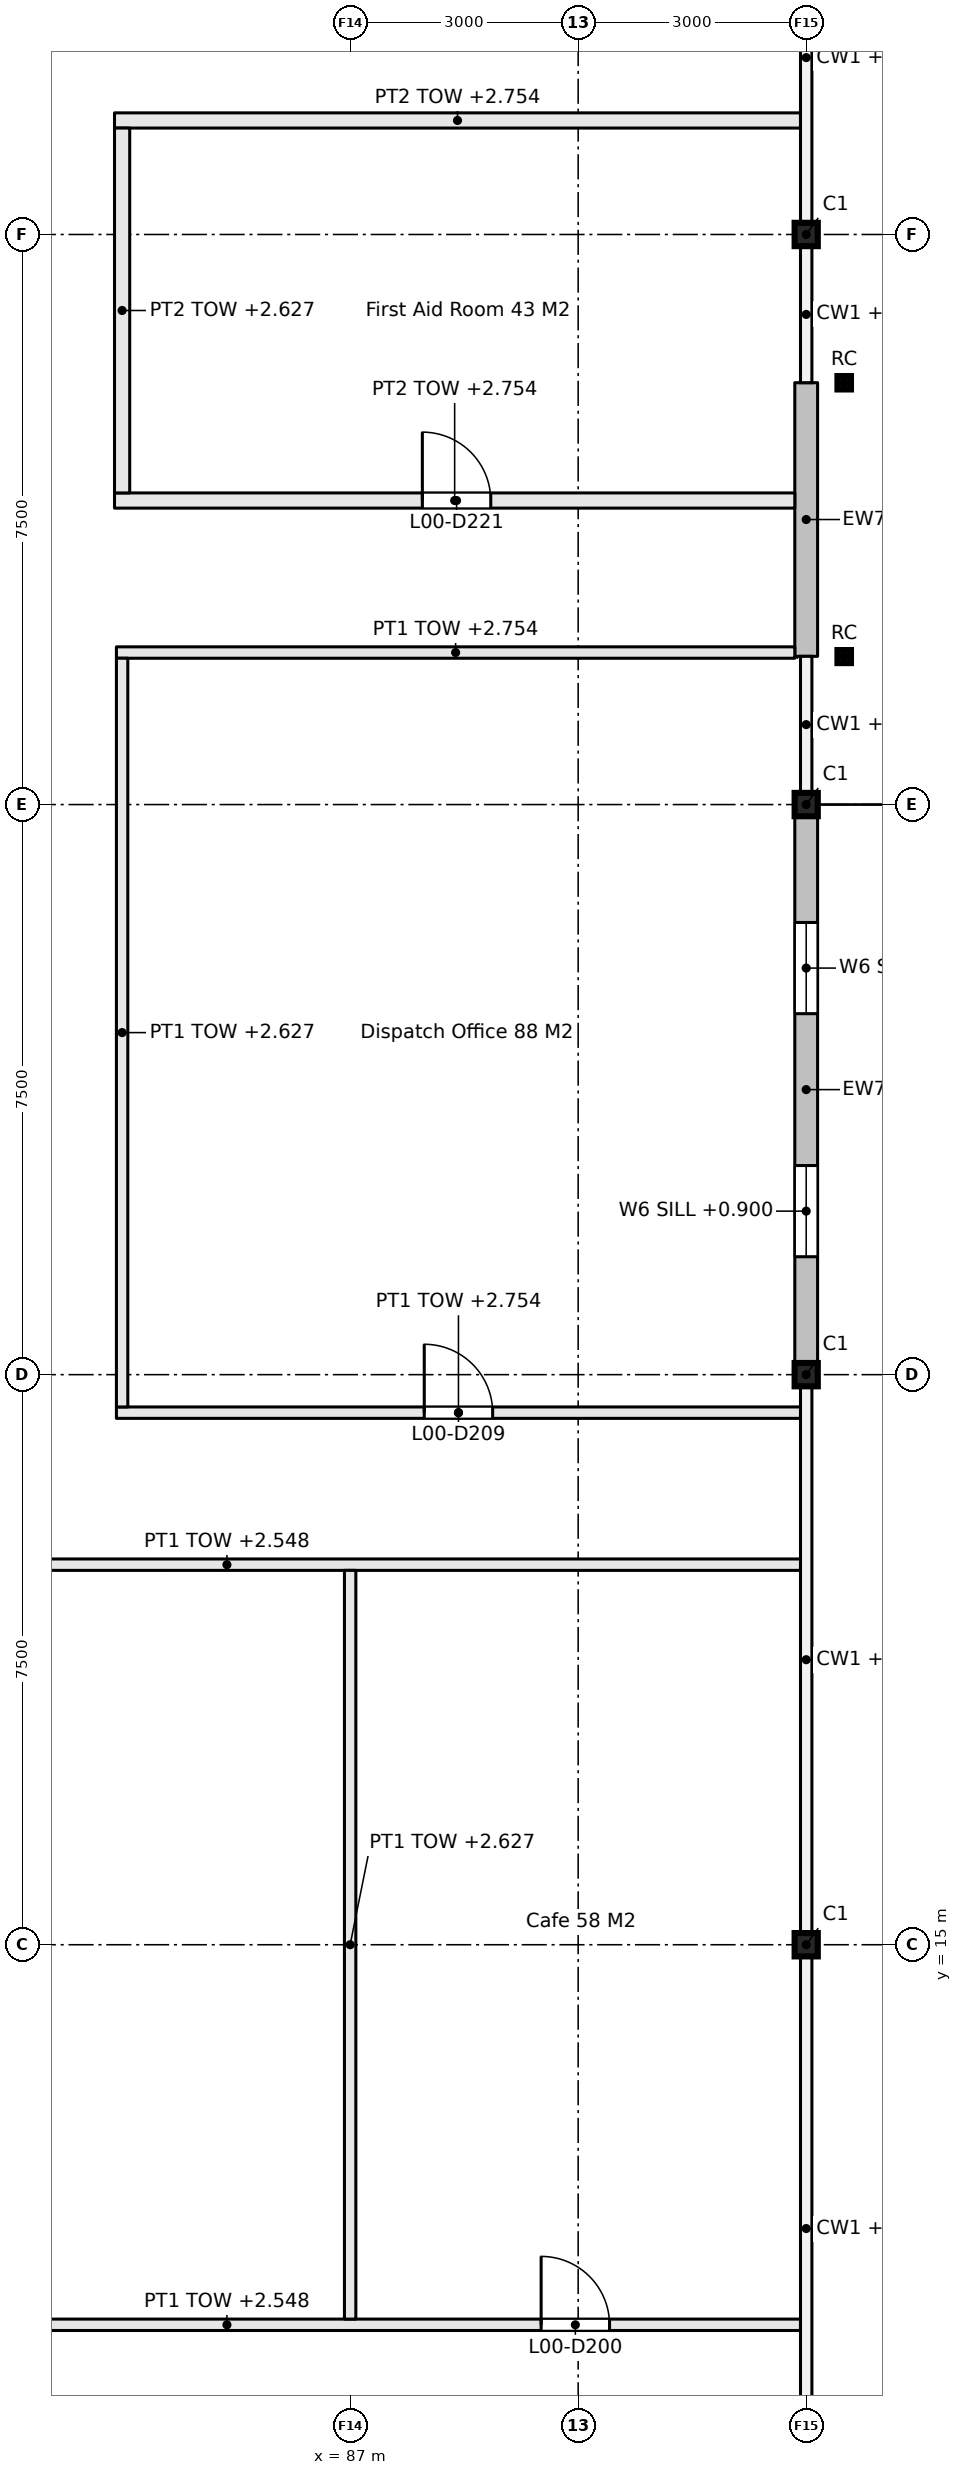
"""IFC4 building model, lengths in metres.
Left out: names, types, materials, properties, quantities, classifications, styles, units other than length and angle.
Written with IfcOpenShell. Run it as: python <this file> out.ifc"""

import sys

from ifc_helpers import new_model, si_unit, direction, frame, frame_2d, origin, origin_2d, place, context, subcontext, project, spatial, rectangle, hollow_rectangle, i_section, extrude, element, fill, save


model = new_model("IFC4")
c1 = context("Model", 3, precision=1e-05, world=origin(), true_north=direction((0.0, 1.0)))
c2 = subcontext(c1, "Body", "Model", "MODEL_VIEW")
j1 = project(units=[si_unit("LENGTHUNIT", "METRE"), si_unit("PLANEANGLEUNIT", "RADIAN")], contexts=[c1])
p1 = place(None, origin())
s1 = spatial("IfcSite", under=j1, at=p1, CompositionType="ELEMENT")
p2 = place(p1, origin())
s2 = spatial("IfcBuilding", under=s1, at=p2, CompositionType="ELEMENT")
p3 = place(p2, origin())
s3 = spatial("IfcBuildingStorey", under=s2, at=p3, CompositionType="ELEMENT", Elevation=0.0)
for number, where, z_axis, x_axis in (
    (1, (93.0, 15.0, -0.25), (0.0, 0.0, 1.0), (1.0, 0.0, 0.0)),
    (2, (93.0, 22.5, -0.25), (0.0, 0.0, 1.0), (1.0, 0.0, 0.0)),
    (3, (93.0, 30.0, -0.25), (0.0, 0.0, 1.0), (1.0, 0.0, 0.0)),
    (4, (93.0, 37.5, -0.25), (0.0, 0.0, 1.0), (1.0, 0.0, 0.0)),
):
    element("IfcColumn", number, at=place(p3, frame(where, z_axis=z_axis, x_axis=x_axis)), inside=s3, PredefinedType="COLUMN", context=c2, shape_type="SweptSolid", body=[
        extrude(i_section(OverallWidth=0.305, OverallDepth=0.307, WebThickness=0.01, FlangeThickness=0.015, FilletRadius=0.015, at=origin_2d()), origin(), (0.0, 0.0, 1.0), 3.55),
    ])
for number, where, z_axis, x_axis in (
    (5, (93.5, 31.95, -0.25), (0.0, 0.0, 1.0), (1.0, 0.0, 0.0)),
    (6, (93.5, 35.55, -0.25), (0.0, 0.0, 1.0), (1.0, 0.0, 0.0)),
):
    element("IfcColumn", number, at=place(p3, frame(where, z_axis=z_axis, x_axis=x_axis)), inside=s3, PredefinedType="COLUMN", context=c2, shape_type="SweptSolid", body=[
        extrude(hollow_rectangle(XDim=0.178, YDim=0.178, WallThickness=0.01, at=origin_2d()), origin(), (0.0, 0.0, 1.0), 3.55),
    ])
p4 = place(p3, frame((71.925, 10.0, 0.0), z_axis=(0.0, 0.0, 1.0), x_axis=(1.0, 0.0, 0.0)))
e7 = element("IfcWall", 7, at=p4, inside=s3, PredefinedType="PARTITIONING", context=c2, shape_type="SweptSolid", body=[
    extrude(rectangle(XDim=21.0, YDim=0.15, at=frame_2d((10.5, 0.0))), origin(), (0.0, 0.0, 1.0), 2.548),
])
p5 = place(p4, frame((17.588, 0.0, 0.0)))
e8 = element("IfcOpeningElement", 8, at=p5, cuts=e7, PredefinedType="OPENING", context=c2, shape_type="SweptSolid", body=[
    extrude(rectangle(XDim=0.9, YDim=2.1, at=frame_2d((0.45, 1.05))), frame((0.0, 0.085, 0.0), z_axis=(0.0, -1.0, 0.0), x_axis=(1.0, 0.0, 0.0)), (0.0, 0.0, 1.0), 0.17),
])
p6 = place(p3, frame((71.925, 20.0, 0.0), z_axis=(0.0, 0.0, 1.0), x_axis=(1.0, 0.0, 0.0)))
e9 = element("IfcWall", 9, at=p6, inside=s3, PredefinedType="PARTITIONING", context=c2, shape_type="SweptSolid", body=[
    extrude(rectangle(XDim=21.0, YDim=0.15, at=frame_2d((10.5, 0.0))), origin(), (0.0, 0.0, 1.0), 2.548),
])
p7 = place(p3, frame((83.925, 22.0, 0.0), z_axis=(0.0, 0.0, 1.0), x_axis=(1.0, 0.0, 0.0)))
e10 = element("IfcWall", 10, at=p7, inside=s3, PredefinedType="PARTITIONING", context=c2, shape_type="SweptSolid", body=[
    extrude(rectangle(XDim=9.0, YDim=0.15, at=frame_2d((4.5, 0.0))), origin(), (0.0, 0.0, 1.0), 2.754),
])
p8 = place(p7, frame((4.05, 0.0, 0.0)))
e11 = element("IfcOpeningElement", 11, at=p8, cuts=e10, PredefinedType="OPENING", context=c2, shape_type="SweptSolid", body=[
    extrude(rectangle(XDim=0.9, YDim=2.1, at=frame_2d((0.45, 1.05))), frame((0.0, 0.085, 0.0), z_axis=(0.0, -1.0, 0.0), x_axis=(1.0, 0.0, 0.0)), (0.0, 0.0, 1.0), 0.17),
])
p9 = place(p3, frame((83.925, 32.0, 0.0), z_axis=(0.0, 0.0, 1.0), x_axis=(1.0, 0.0, 0.0)))
e12 = element("IfcWall", 12, at=p9, inside=s3, PredefinedType="PARTITIONING", context=c2, shape_type="SweptSolid", body=[
    extrude(rectangle(XDim=8.925, YDim=0.15, at=frame_2d((4.462, 0.0))), origin(), (0.0, 0.0, 1.0), 2.754),
])
p10 = place(p3, frame((83.9, 34.0, 0.0), z_axis=(0.0, 0.0, 1.0), x_axis=(1.0, 0.0, 0.0)))
e13 = element("IfcWall", 13, at=p10, inside=s3, PredefinedType="PARTITIONING", context=c2, shape_type="SweptSolid", body=[
    extrude(rectangle(XDim=8.95, YDim=0.2, at=frame_2d((4.475, 0.0))), origin(), (0.0, 0.0, 1.0), 2.754),
])
p11 = place(p10, frame((4.05, 0.0, 0.0)))
e14 = element("IfcOpeningElement", 14, at=p11, cuts=e13, PredefinedType="OPENING", context=c2, shape_type="SweptSolid", body=[
    extrude(rectangle(XDim=0.9, YDim=2.1, at=frame_2d((0.45, 1.05))), frame((0.0, 0.11, 0.0), z_axis=(0.0, -1.0, 0.0), x_axis=(1.0, 0.0, 0.0)), (0.0, 0.0, 1.0), 0.22),
])
p12 = place(p3, frame((83.9, 39.0, 0.0), z_axis=(0.0, 0.0, 1.0), x_axis=(1.0, 0.0, 0.0)))
e15 = element("IfcWall", 15, at=p12, inside=s3, PredefinedType="PARTITIONING", context=c2, shape_type="SweptSolid", body=[
    extrude(rectangle(XDim=9.025, YDim=0.2, at=frame_2d((4.513, 0.0))), origin(), (0.0, 0.0, 1.0), 2.754),
])
p13 = place(p3, frame((84.0, 22.075, 0.0), z_axis=(0.0, 0.0, 1.0), x_axis=(0.0, 1.0, 0.0)))
e16 = element("IfcWall", 16, at=p13, inside=s3, PredefinedType="PARTITIONING", context=c2, shape_type="SweptSolid", body=[
    extrude(rectangle(XDim=9.85, YDim=0.15, at=frame_2d((4.925, 0.0))), origin(), (0.0, 0.0, 1.0), 2.627),
])
p14 = place(p3, frame((84.0, 34.1, 0.0), z_axis=(0.0, 0.0, 1.0), x_axis=(0.0, 1.0, 0.0)))
e17 = element("IfcWall", 17, at=p14, inside=s3, PredefinedType="PARTITIONING", context=c2, shape_type="SweptSolid", body=[
    extrude(rectangle(XDim=4.8, YDim=0.2, at=frame_2d((2.4, 0.0))), origin(), (0.0, 0.0, 1.0), 2.627),
])
p15 = place(p3, frame((87.0, 10.075, 0.0), z_axis=(0.0, 0.0, 1.0), x_axis=(0.0, 1.0, 0.0)))
e18 = element("IfcWall", 18, at=p15, inside=s3, PredefinedType="PARTITIONING", context=c2, shape_type="SweptSolid", body=[
    extrude(rectangle(XDim=9.85, YDim=0.15, at=frame_2d((4.925, 0.0))), origin(), (0.0, 0.0, 1.0), 2.627),
])
p16 = place(p3, frame((93.0, 22.654, 0.0), z_axis=(0.0, 0.0, 1.0), x_axis=(0.0, 1.0, 0.0)))
e19 = element("IfcWall", 19, at=p16, inside=s3, PredefinedType="SOLIDWALL", context=c2, shape_type="SweptSolid", body=[
    extrude(rectangle(XDim=7.193, YDim=0.3, at=frame_2d((3.596, 0.0))), origin(), (0.0, 0.0, 1.0), 2.627),
])
p17 = place(p16, frame((1.398, 0.0, 0.9)))
e20 = element("IfcOpeningElement", 20, at=p17, cuts=e19, PredefinedType="OPENING", context=c2, shape_type="SweptSolid", body=[
    extrude(rectangle(XDim=1.2, YDim=1.2, at=frame_2d((0.6, 0.6))), frame((0.0, 0.16, 0.0), z_axis=(0.0, -1.0, 0.0), x_axis=(1.0, 0.0, 0.0)), (0.0, 0.0, 1.0), 0.32),
])
p18 = place(p16, frame((4.595, 0.0, 0.9)))
e21 = element("IfcOpeningElement", 21, at=p18, cuts=e19, PredefinedType="OPENING", context=c2, shape_type="SweptSolid", body=[
    extrude(rectangle(XDim=1.2, YDim=1.2, at=frame_2d((0.6, 0.6))), frame((0.0, 0.16, 0.0), z_axis=(0.0, -1.0, 0.0), x_axis=(1.0, 0.0, 0.0)), (0.0, 0.0, 1.0), 0.32),
])
p19 = place(p3, frame((93.0, 31.95, 0.0), z_axis=(0.0, 0.0, 1.0), x_axis=(0.0, 1.0, 0.0)))
e22 = element("IfcWall", 22, at=p19, inside=s3, PredefinedType="SOLIDWALL", context=c2, shape_type="SweptSolid", body=[
    extrude(rectangle(XDim=3.6, YDim=0.3, at=frame_2d((1.8, 0.0))), origin(), (0.0, 0.0, 1.0), 2.627),
])
p20 = place(p5, origin())
e23 = element("IfcDoor", 23, at=p20, inside=s3, OperationType="SINGLE_SWING_RIGHT", PredefinedType="DOOR", context=c2, shape_type="SweptSolid", body=[
    extrude(rectangle(XDim=0.9, YDim=2.1, at=frame_2d((0.45, 1.05))), frame((0.0, 0.025, 0.0), z_axis=(0.0, -1.0, 0.0), x_axis=(1.0, 0.0, 0.0)), (0.0, 0.0, 1.0), 0.05),
])
fill(e8, e23)
p21 = place(p8, origin())
e24 = element("IfcDoor", 24, at=p21, inside=s3, OperationType="SINGLE_SWING_LEFT", PredefinedType="DOOR", context=c2, shape_type="SweptSolid", body=[
    extrude(rectangle(XDim=0.9, YDim=2.1, at=frame_2d((0.45, 1.05))), frame((0.0, 0.025, 0.0), z_axis=(0.0, -1.0, 0.0), x_axis=(1.0, 0.0, 0.0)), (0.0, 0.0, 1.0), 0.05),
])
fill(e11, e24)
p22 = place(p11, origin())
e25 = element("IfcDoor", 25, at=p22, inside=s3, OperationType="SINGLE_SWING_LEFT", PredefinedType="DOOR", context=c2, shape_type="SweptSolid", body=[
    extrude(rectangle(XDim=0.9, YDim=2.1, at=frame_2d((0.45, 1.05))), frame((0.0, 0.025, 0.0), z_axis=(0.0, -1.0, 0.0), x_axis=(1.0, 0.0, 0.0)), (0.0, 0.0, 1.0), 0.05),
])
fill(e14, e25)
p23 = place(p17, origin())
e26 = element("IfcWindow", 26, at=p23, inside=s3, PartitioningType="SINGLE_PANEL", PredefinedType="WINDOW", context=c2, shape_type="SweptSolid", body=[
    extrude(rectangle(XDim=1.2, YDim=1.2, at=frame_2d((0.6, 0.6))), frame((0.0, 0.03, 0.0), z_axis=(0.0, -1.0, 0.0), x_axis=(1.0, 0.0, 0.0)), (0.0, 0.0, 1.0), 0.06),
])
fill(e20, e26)
p24 = place(p18, origin())
e27 = element("IfcWindow", 27, at=p24, inside=s3, PartitioningType="SINGLE_PANEL", PredefinedType="WINDOW", context=c2, shape_type="SweptSolid", body=[
    extrude(rectangle(XDim=1.2, YDim=1.2, at=frame_2d((0.6, 0.6))), frame((0.0, 0.03, 0.0), z_axis=(0.0, -1.0, 0.0), x_axis=(1.0, 0.0, 0.0)), (0.0, 0.0, 1.0), 0.06),
])
fill(e21, e27)
save(model, sys.argv[1])
